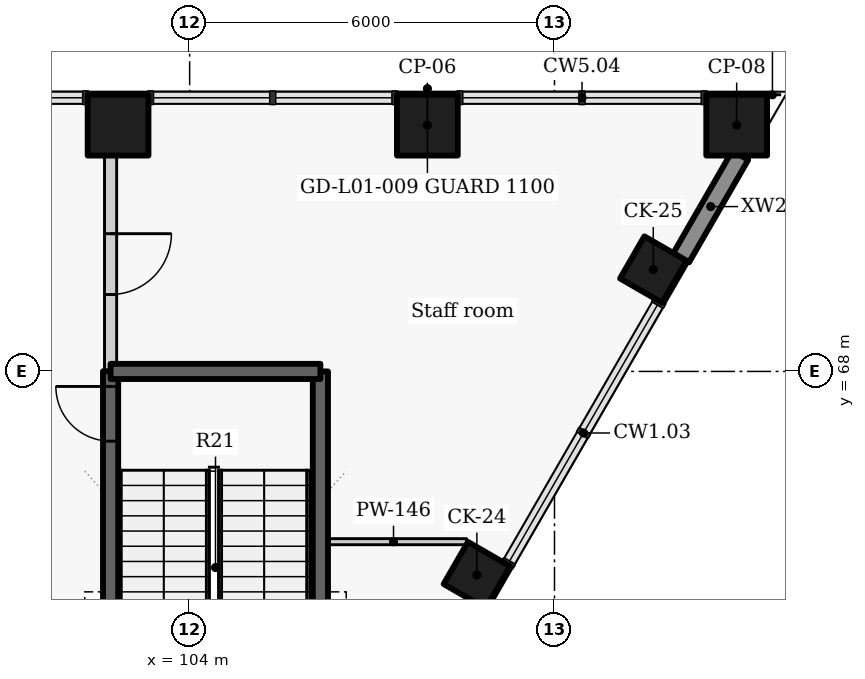
"""IFC4 building model, lengths in metres.
Left out: names, types, materials, properties, quantities, classifications, styles, units other than length and angle.
Written with IfcOpenShell. Run it as: python <this file> out.ifc"""

import sys

from ifc_helpers import new_model, si_unit, direction, frame, frame_2d, origin, origin_2d, place, context, subcontext, project, spatial, rectangle, extrude, element, fill, save


model = new_model("IFC4")
c1 = context("Model", 3, precision=1e-05, world=origin(), true_north=direction((0.0, 1.0)))
c2 = subcontext(c1, "Body", "Model", "MODEL_VIEW")
j1 = project(units=[si_unit("LENGTHUNIT", "METRE"), si_unit("PLANEANGLEUNIT", "RADIAN")], contexts=[c1])
p1 = place(None, origin())
s1 = spatial("IfcSite", under=j1, at=p1, CompositionType="ELEMENT")
p2 = place(p1, origin())
s2 = spatial("IfcBuilding", under=s1, at=p2, CompositionType="ELEMENT")
p3 = place(p2, frame((0.0, 0.0, 6.6)))
s3 = spatial("IfcBuildingStorey", under=s2, at=p3, CompositionType="ELEMENT", Elevation=6.6)
for number, where, z_axis, x_axis in (
    (1, (108.723, 64.65, 0.0), (0.0, 0.0, 1.0), (0.5, 0.866, 0.0)),
    (2, (111.625, 69.675, 0.0), (0.0, 0.0, 1.0), (0.5, 0.866, 0.0)),
):
    element("IfcColumn", number, at=place(p3, frame(where, z_axis=z_axis, x_axis=x_axis)), inside=s3, PredefinedType="COLUMN", context=c2, shape_type="SweptSolid", body=[
        extrude(rectangle(XDim=0.8, YDim=0.8, at=origin_2d()), origin(), (0.0, 0.0, 1.0), 4.8),
    ])
for number, where, z_axis, x_axis in (
    (3, (102.823, 72.05, 0.0), (0.0, 0.0, 1.0), (1.0, 0.0, 0.0)),
    (4, (107.909, 72.05, 0.0), (0.0, 0.0, 1.0), (1.0, 0.0, 0.0)),
    (5, (112.996, 72.05, 0.0), (0.0, 0.0, 1.0), (1.0, 0.0, 0.0)),
):
    element("IfcColumn", number, at=place(p3, frame(where, z_axis=z_axis, x_axis=x_axis)), inside=s3, PredefinedType="COLUMN", context=c2, shape_type="SweptSolid", body=[
        extrude(rectangle(XDim=1.0, YDim=1.0, at=origin_2d()), origin(), (0.0, 0.0, 1.0), 4.8),
    ])
p4 = place(p3, frame((112.082, 69.868, 0.0), z_axis=(0.0, 0.0, 1.0), x_axis=(0.500051850797, 0.865995465643, 0.0)))
e6 = element("IfcWall", 6, at=p4, inside=s3, PredefinedType="SOLIDWALL", context=c2, shape_type="SweptSolid", body=[
    extrude(rectangle(XDim=1.946, YDim=0.3, at=frame_2d((0.973, 0.0))), origin(), (0.0, 0.0, 1.0), 3.6),
])
p5 = place(p3, frame((102.7, 61.547, -0.3), z_axis=(0.0, 0.0, 1.0), x_axis=(0.0, 1.0, 0.0)))
e7 = element("IfcWall", 7, at=p5, inside=s3, PredefinedType="SHEAR", context=c2, shape_type="SweptSolid", body=[
    extrude(rectangle(XDim=6.456, YDim=0.25, at=frame_2d((3.228, 0.0))), origin(), (0.0, 0.0, 1.0), 4.8),
])
p6 = place(p5, frame((5.306, 0.0, 0.3)))
e8 = element("IfcOpeningElement", 8, at=p6, cuts=e7, PredefinedType="OPENING", context=c2, shape_type="SweptSolid", body=[
    extrude(rectangle(XDim=0.9, YDim=2.1, at=frame_2d((0.45, 1.05))), frame((0.0, 0.135, 0.0), z_axis=(0.0, -1.0, 0.0), x_axis=(1.0, 0.0, 0.0)), (0.0, 0.0, 1.0), 0.27),
])
p7 = place(p3, frame((102.7, 71.533, 0.0), z_axis=(0.0, 0.0, 1.0), x_axis=(0.0, -1.0, 0.0)))
e9 = element("IfcWall", 9, at=p7, inside=s3, PredefinedType="PARTITIONING", context=c2, shape_type="SweptSolid", body=[
    extrude(rectangle(XDim=3.536, YDim=0.2, at=frame_2d((1.768, 0.0))), origin(), (0.0, 0.0, 1.0), 4.5),
])
p8 = place(p7, frame((1.268, 0.0, 0.0)))
e10 = element("IfcOpeningElement", 10, at=p8, cuts=e9, PredefinedType="OPENING", context=c2, shape_type="SweptSolid", body=[
    extrude(rectangle(XDim=1.0, YDim=2.1, at=frame_2d((0.5, 1.05))), frame((0.0, 0.11, 0.0), z_axis=(0.0, -1.0, 0.0), x_axis=(1.0, 0.0, 0.0)), (0.0, 0.0, 1.0), 0.22),
])
p9 = place(p3, frame((106.15, 61.55, -0.3), z_axis=(0.0, 0.0, 1.0), x_axis=(0.0, 1.0, 0.0)))
e11 = element("IfcWall", 11, at=p9, inside=s3, PredefinedType="SHEAR", context=c2, shape_type="SweptSolid", body=[
    extrude(rectangle(XDim=6.45, YDim=0.25, at=frame_2d((3.225, 0.0))), origin(), (0.0, 0.0, 1.0), 4.8),
])
p10 = place(p3, frame((102.7, 68.0, -0.3), z_axis=(0.0, 0.0, 1.0), x_axis=(1.0, 0.0, 0.0)))
e12 = element("IfcWall", 12, at=p10, inside=s3, PredefinedType="SHEAR", context=c2, shape_type="SweptSolid", body=[
    extrude(rectangle(XDim=3.45, YDim=0.25, at=frame_2d((1.725, 0.0))), origin(), (0.0, 0.0, 1.0), 4.8),
])
p11 = place(p3, frame((106.15, 65.2, 0.0), z_axis=(0.0, 0.0, 1.0), x_axis=(1.0, 0.0, 0.0)))
e13 = element("IfcWall", 13, at=p11, inside=s3, PredefinedType="PARTITIONING", context=c2, shape_type="SweptSolid", body=[
    extrude(rectangle(XDim=2.406, YDim=0.1, at=frame_2d((1.203, 0.0))), origin(), (0.0, 0.0, 1.0), 4.5),
])
p12 = place(p6, origin())
e14 = element("IfcDoor", 14, at=p12, inside=s3, OperationType="SINGLE_SWING_RIGHT", PredefinedType="DOOR", context=c2, shape_type="SweptSolid", body=[
    extrude(rectangle(XDim=0.9, YDim=2.1, at=frame_2d((0.45, 1.05))), frame((0.0, 0.025, 0.0), z_axis=(0.0, -1.0, 0.0), x_axis=(1.0, 0.0, 0.0)), (0.0, 0.0, 1.0), 0.05),
])
fill(e8, e14)
p13 = place(p8, origin())
e15 = element("IfcDoor", 15, at=p13, inside=s3, OperationType="SINGLE_SWING_LEFT", PredefinedType="DOOR", context=c2, shape_type="SweptSolid", body=[
    extrude(rectangle(XDim=1.0, YDim=2.1, at=frame_2d((0.5, 1.05))), frame((0.0, 0.025, 0.0), z_axis=(0.0, -1.0, 0.0), x_axis=(1.0, 0.0, 0.0)), (0.0, 0.0, 1.0), 0.05),
])
fill(e10, e15)
save(model, sys.argv[1])
